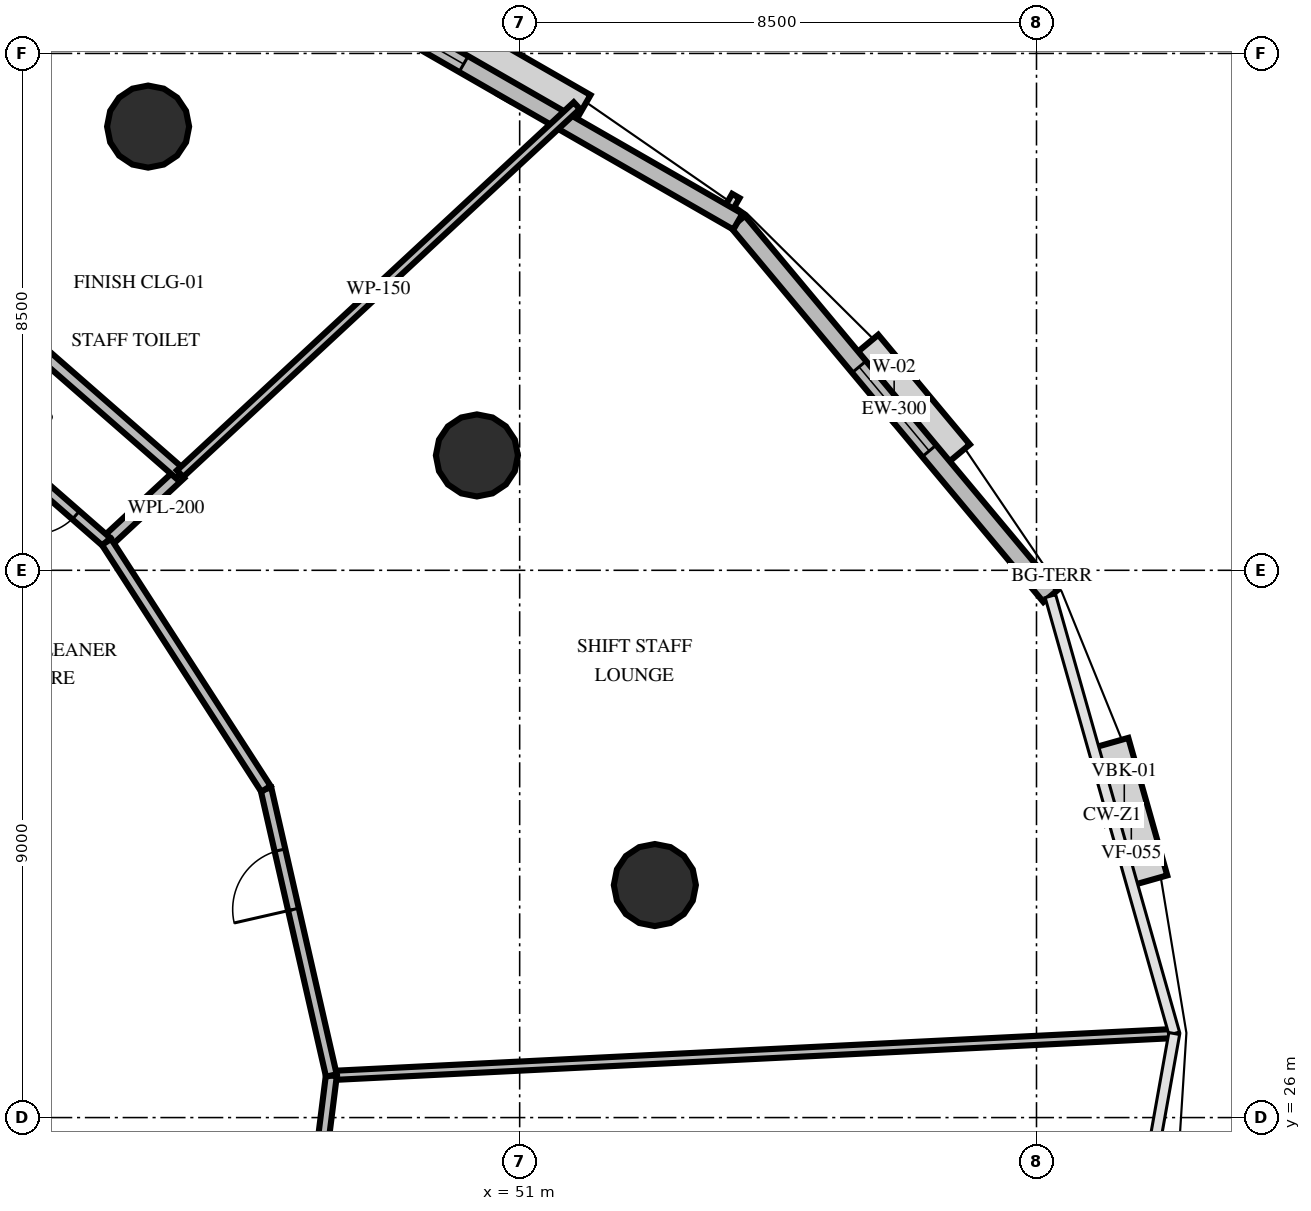
"""IFC4 building model, lengths in metres.
Left out: names, types, materials, properties, quantities, classifications, styles, units other than length and angle.
Written with IfcOpenShell. Run it as: python <this file> out.ifc"""

import sys

from ifc_helpers import new_model, si_unit, direction, frame, frame_2d, origin, origin_2d, place, context, subcontext, project, spatial, rectangle, circle, extrude, element, fill, save


model = new_model("IFC4")
c1 = context("Model", 3, precision=1e-05, world=origin(), true_north=direction((0.0, 1.0)))
c2 = subcontext(c1, "Body", "Model", "MODEL_VIEW")
j1 = project(units=[si_unit("LENGTHUNIT", "METRE"), si_unit("PLANEANGLEUNIT", "RADIAN")], contexts=[c1])
p1 = place(None, origin())
s1 = spatial("IfcSite", under=j1, at=p1, CompositionType="ELEMENT")
p2 = place(p1, origin())
s2 = spatial("IfcBuilding", under=s1, at=p2, CompositionType="ELEMENT")
p3 = place(p2, frame((0.0, 0.0, 42.6)))
s3 = spatial("IfcBuildingStorey", under=s2, at=p3, CompositionType="ELEMENT", Elevation=42.6)
for number, where, z_axis, x_axis in (
    (1, (53.223, 29.824, 0.0), (0.0, 0.0, 1.0), (1.0, 0.0, 0.0)),
    (2, (50.297, 36.889, 0.0), (0.0, 0.0, 1.0), (1.0, 0.0, 0.0)),
    (3, (44.889, 42.297, 0.0), (0.0, 0.0, 1.0), (1.0, 0.0, 0.0)),
):
    element("IfcColumn", number, at=place(p3, frame(where, z_axis=z_axis, x_axis=x_axis)), inside=s3, PredefinedType="COLUMN", context=c2, shape_type="SweptSolid", body=[
        extrude(circle(Radius=0.675, at=origin_2d()), origin(), (0.0, 0.0, 1.0), 4.2),
    ])
p4 = place(p3, frame((59.729, 34.575, 0.0), z_axis=(0.0, 0.0, 1.0), x_axis=(-0.640779936228, 0.767724607739, 0.0)))
e4 = element("IfcWall", 4, at=p4, inside=s3, PredefinedType="SOLIDWALL", context=c2, shape_type="SweptSolid", body=[
    extrude(rectangle(XDim=8.022, YDim=0.3, at=frame_2d((4.011, 0.0))), origin(), (0.0, 0.0, 1.0), 3.0),
])
p5 = place(p4, frame((3.111, 0.0, 0.8)))
e5 = element("IfcOpeningElement", 5, at=p5, cuts=e4, PredefinedType="OPENING", context=c2, shape_type="SweptSolid", body=[
    extrude(rectangle(XDim=1.8, YDim=1.95, at=frame_2d((0.9, 0.975))), frame((0.0, 0.16, 0.0), z_axis=(0.0, -1.0, 0.0), x_axis=(1.0, 0.0, 0.0)), (0.0, 0.0, 1.0), 0.32),
])
p6 = place(p3, frame((54.589, 40.733, 0.0), z_axis=(0.0, 0.0, 1.0), x_axis=(-0.867006774095, 0.498296351254, 0.0)))
e6 = element("IfcWall", 6, at=p6, inside=s3, PredefinedType="SOLIDWALL", context=c2, shape_type="SweptSolid", body=[
    extrude(rectangle(XDim=8.793, YDim=0.3, at=frame_2d((4.396, 0.0))), origin(), (0.0, 0.0, 1.0), 3.0),
])
p7 = place(p6, frame((5.202, 0.0, 0.8)))
e7 = element("IfcOpeningElement", 7, at=p7, cuts=e6, PredefinedType="OPENING", context=c2, shape_type="SweptSolid", body=[
    extrude(rectangle(XDim=1.8, YDim=1.95, at=frame_2d((0.9, 0.975))), frame((0.0, 0.16, 0.0), z_axis=(0.0, -1.0, 0.0), x_axis=(1.0, 0.0, 0.0)), (0.0, 0.0, 1.0), 0.32),
])
p8 = place(p3, frame((44.205, 35.467, 0.0), z_axis=(0.0, 0.0, 1.0), x_axis=(0.733099110451, 0.680121823099, 0.0)))
e8 = element("IfcWall", 8, at=p8, inside=s3, PredefinedType="PLUMBINGWALL", context=c2, shape_type="SweptSolid", body=[
    extrude(rectangle(XDim=1.65, YDim=0.2, at=frame_2d((0.825, 0.0))), origin(), (0.0, 0.0, 1.0), 3.0),
])
p9 = place(p3, frame((45.415, 36.589, 0.0), z_axis=(0.0, 0.0, 1.0), x_axis=(-0.752990077627, 0.658031870806, 0.0)))
e9 = element("IfcWall", 9, at=p9, inside=s3, PredefinedType="PLUMBINGWALL", context=c2, shape_type="SweptSolid", body=[
    extrude(rectangle(XDim=3.255, YDim=0.2, at=frame_2d((1.627, 0.0))), origin(), (0.0, 0.0, 1.0), 3.0),
])
p10 = place(p3, frame((44.205, 35.467, 0.0), z_axis=(0.0, 0.0, 1.0), x_axis=(-0.753033847665, 0.657981781109, 0.0)))
e10 = element("IfcWall", 10, at=p10, inside=s3, PredefinedType="PARTITIONING", context=c2, shape_type="SweptSolid", body=[
    extrude(rectangle(XDim=2.91, YDim=0.18, at=frame_2d((1.455, 0.0))), origin(), (0.0, 0.0, 1.0), 3.0),
])
p11 = place(p10, frame((0.669, 0.0, 0.0)))
e11 = element("IfcOpeningElement", 11, at=p11, cuts=e10, PredefinedType="OPENING", context=c2, shape_type="SweptSolid", body=[
    extrude(rectangle(XDim=0.92, YDim=2.1, at=frame_2d((0.46, 1.05))), frame((0.0, 0.1, 0.0), z_axis=(0.0, -1.0, 0.0), x_axis=(1.0, 0.0, 0.0)), (0.0, 0.0, 1.0), 0.2),
])
p12 = place(p3, frame((45.415, 36.589, 0.0), z_axis=(0.0, 0.0, 1.0), x_axis=(0.733147050815, 0.680070144824, 0.0)))
e12 = element("IfcWall", 12, at=p12, inside=s3, PredefinedType="PARTITIONING", context=c2, shape_type="SweptSolid", body=[
    extrude(rectangle(XDim=8.901, YDim=0.15, at=frame_2d((4.45, 0.0))), origin(), (0.0, 0.0, 1.0), 3.0),
])
p13 = place(p3, frame((47.903, 26.692, 0.0), z_axis=(0.0, 0.0, 1.0), x_axis=(0.99876293138, 0.049725314484, 0.0)))
e13 = element("IfcWall", 13, at=p13, inside=s3, PredefinedType="PARTITIONING", context=c2, shape_type="SweptSolid", body=[
    extrude(rectangle(XDim=13.88, YDim=0.15, at=frame_2d((6.94, 0.0))), origin(), (0.0, 0.0, 1.0), 3.0),
])
p14 = place(p3, frame((47.301, 21.895, 0.0), z_axis=(0.0, 0.0, 1.0), x_axis=(0.124482228692, 0.992221837464, 0.0)))
e14 = element("IfcWall", 14, at=p14, inside=s3, PredefinedType="PARTITIONING", context=c2, shape_type="SweptSolid", body=[
    extrude(rectangle(XDim=4.834, YDim=0.18, at=frame_2d((2.417, 0.0))), origin(), (0.0, 0.0, 1.0), 3.0),
])
p15 = place(p3, frame((47.903, 26.692, 0.0), z_axis=(0.0, 0.0, 1.0), x_axis=(-0.222402444604, 0.974954949028, 0.0)))
e15 = element("IfcWall", 15, at=p15, inside=s3, PredefinedType="PARTITIONING", context=c2, shape_type="SweptSolid", body=[
    extrude(rectangle(XDim=4.834, YDim=0.18, at=frame_2d((2.417, 0.0))), origin(), (0.0, 0.0, 1.0), 3.0),
])
p16 = place(p15, frame((2.801, 0.0, 0.0)))
e16 = element("IfcOpeningElement", 16, at=p16, cuts=e15, PredefinedType="OPENING", context=c2, shape_type="SweptSolid", body=[
    extrude(rectangle(XDim=1.0, YDim=2.15, at=frame_2d((0.5, 1.075))), frame((0.0, 0.1, 0.0), z_axis=(0.0, -1.0, 0.0), x_axis=(1.0, 0.0, 0.0)), (0.0, 0.0, 1.0), 0.2),
])
p17 = place(p3, frame((46.828, 31.406, 0.0), z_axis=(0.0, 0.0, 1.0), x_axis=(-0.542438562589, 0.840095474227, 0.0)))
e17 = element("IfcWall", 17, at=p17, inside=s3, PredefinedType="PARTITIONING", context=c2, shape_type="SweptSolid", body=[
    extrude(rectangle(XDim=4.834, YDim=0.18, at=frame_2d((2.417, 0.0))), origin(), (0.0, 0.0, 1.0), 3.0),
])
p18 = place(p5, origin())
e18 = element("IfcWindow", 18, at=p18, inside=s3, PartitioningType="SINGLE_PANEL", PredefinedType="WINDOW", context=c2, shape_type="SweptSolid", body=[
    extrude(rectangle(XDim=1.8, YDim=1.95, at=frame_2d((0.9, 0.975))), frame((0.0, 0.03, 0.0), z_axis=(0.0, -1.0, 0.0), x_axis=(1.0, 0.0, 0.0)), (0.0, 0.0, 1.0), 0.06),
])
fill(e5, e18)
p19 = place(p7, origin())
e19 = element("IfcWindow", 19, at=p19, inside=s3, PartitioningType="SINGLE_PANEL", PredefinedType="WINDOW", context=c2, shape_type="SweptSolid", body=[
    extrude(rectangle(XDim=1.8, YDim=1.95, at=frame_2d((0.9, 0.975))), frame((0.0, 0.03, 0.0), z_axis=(0.0, -1.0, 0.0), x_axis=(1.0, 0.0, 0.0)), (0.0, 0.0, 1.0), 0.06),
])
fill(e7, e19)
p20 = place(p11, origin())
e20 = element("IfcDoor", 20, at=p20, inside=s3, OperationType="SINGLE_SWING_RIGHT", PredefinedType="DOOR", context=c2, shape_type="SweptSolid", body=[
    extrude(rectangle(XDim=0.92, YDim=2.1, at=frame_2d((0.46, 1.05))), frame((0.0, 0.025, 0.0), z_axis=(0.0, -1.0, 0.0), x_axis=(1.0, 0.0, 0.0)), (0.0, 0.0, 1.0), 0.05),
])
fill(e11, e20)
p21 = place(p16, origin())
e21 = element("IfcDoor", 21, at=p21, inside=s3, OperationType="SINGLE_SWING_LEFT", PredefinedType="DOOR", context=c2, shape_type="SweptSolid", body=[
    extrude(rectangle(XDim=1.0, YDim=2.15, at=frame_2d((0.5, 1.075))), frame((0.0, 0.025, 0.0), z_axis=(0.0, -1.0, 0.0), x_axis=(1.0, 0.0, 0.0)), (0.0, 0.0, 1.0), 0.05),
])
fill(e16, e21)
save(model, sys.argv[1])
